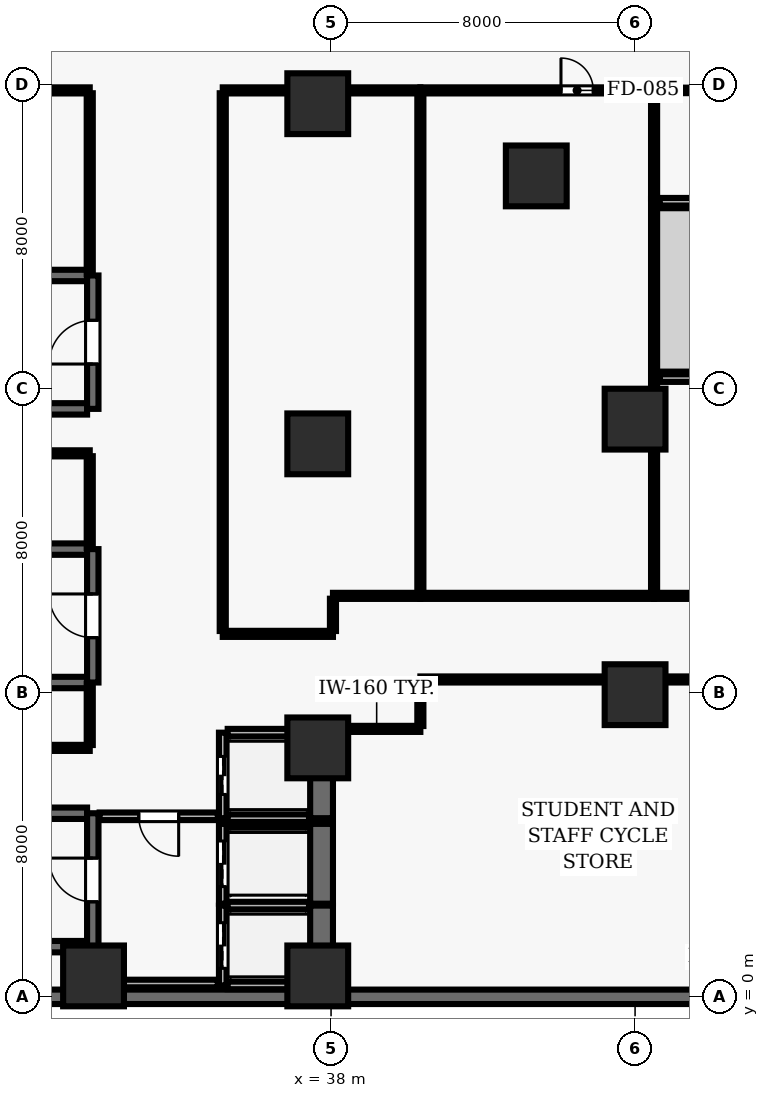
"""IFC4 building model, lengths in metres.
Left out: names, types, materials, properties, quantities, classifications, styles, units other than length and angle.
Written with IfcOpenShell. Run it as: python <this file> out.ifc"""

import sys

from ifc_helpers import new_model, si_unit, direction, frame, frame_2d, origin, origin_2d, place, context, subcontext, project, spatial, rectangle, extrude, element, fill, save


model = new_model("IFC4")
c1 = context("Model", 3, precision=1e-05, world=origin(), true_north=direction((0.0, 1.0)))
c2 = subcontext(c1, "Body", "Model", "MODEL_VIEW")
j1 = project(units=[si_unit("LENGTHUNIT", "METRE"), si_unit("PLANEANGLEUNIT", "RADIAN")], contexts=[c1])
p1 = place(None, origin())
s1 = spatial("IfcSite", under=j1, at=p1, CompositionType="ELEMENT")
p2 = place(p1, origin())
s2 = spatial("IfcBuilding", under=s1, at=p2, CompositionType="ELEMENT")
p3 = place(p2, frame((0.0, 0.0, -4.5)))
s3 = spatial("IfcBuildingStorey", under=s2, at=p3, CompositionType="ELEMENT", Elevation=-4.5)
for number, where, z_axis, x_axis in (
    (1, (31.75, 0.55, 0.0), (0.0, 0.0, 1.0), (1.0, 0.0, 0.0)),
    (2, (37.65, 0.55, 0.0), (0.0, 0.0, 1.0), (1.0, 0.0, 0.0)),
    (3, (37.65, 6.55, 0.0), (0.0, 0.0, 1.0), (1.0, 0.0, 0.0)),
    (4, (37.65, 14.55, 0.0), (0.0, 0.0, 1.0), (1.0, 0.0, 0.0)),
    (5, (37.65, 23.5, 0.0), (0.0, 0.0, 1.0), (1.0, 0.0, 0.0)),
    (6, (46.0, 7.95, 0.0), (0.0, 0.0, 1.0), (1.0, 0.0, 0.0)),
    (7, (46.0, 15.2, 0.0), (0.0, 0.0, 1.0), (1.0, 0.0, 0.0)),
    (8, (43.4, 21.6, 0.0), (0.0, 0.0, 1.0), (1.0, 0.0, 0.0)),
):
    element("IfcColumn", number, at=place(p3, frame(where, z_axis=z_axis, x_axis=x_axis)), inside=s3, PredefinedType="COLUMN", context=c2, shape_type="SweptSolid", body=[
        extrude(rectangle(XDim=1.6, YDim=1.6, at=origin_2d()), origin(), (0.0, 0.0, 1.0), 4.5),
    ])
p4 = place(p3, frame((24.5, 0.0, 0.0), z_axis=(0.0, 0.0, 1.0), x_axis=(1.0, 0.0, 0.0)))
e9 = element("IfcWall", 9, at=p4, inside=s3, PredefinedType="USERDEFINED", context=c2, shape_type="SweptSolid", body=[
    extrude(rectangle(XDim=49.0, YDim=0.38, at=frame_2d((24.5, 0.0))), origin(), (0.0, 0.0, 1.0), 4.22),
])
for number, where, z_axis, x_axis in (
    (10, (31.58, 4.83, 0.0), (0.0, 0.0, 1.0), (-1.0, 0.0, 0.0)),
    (11, (23.22, 1.32, 0.0), (0.0, 0.0, 1.0), (1.0, 0.0, 0.0)),
):
    element("IfcWall", number, at=place(p3, frame(where, z_axis=z_axis, x_axis=x_axis)), inside=s3, PredefinedType="SHEAR", context=c2, shape_type="SweptSolid", body=[
        extrude(rectangle(XDim=8.36, YDim=0.3, at=frame_2d((4.18, 0.0))), origin(), (0.0, 0.0, 1.0), 4.22),
    ])
p5 = place(p3, frame((31.73, 0.96, 0.0), z_axis=(0.0, 0.0, 1.0), x_axis=(0.0, 1.0, 0.0)))
e12 = element("IfcWall", 12, at=p5, inside=s3, PredefinedType="SHEAR", context=c2, shape_type="SweptSolid", body=[
    extrude(rectangle(XDim=3.87, YDim=0.3, at=frame_2d((1.935, 0.0))), origin(), (0.0, 0.0, 1.0), 4.22),
])
p6 = place(p5, frame((1.54, 0.0, 0.0)))
e13 = element("IfcOpeningElement", 13, at=p6, cuts=e12, PredefinedType="OPENING", context=c2, shape_type="SweptSolid", body=[
    extrude(rectangle(XDim=1.15, YDim=2.15, at=frame_2d((0.575, 1.075))), frame((0.0, 0.16, 0.0), z_axis=(0.0, -1.0, 0.0), x_axis=(1.0, 0.0, 0.0)), (0.0, 0.0, 1.0), 0.32),
])
for number, where, z_axis, x_axis in (
    (14, (31.58, 18.98, 0.0), (0.0, 0.0, 1.0), (-1.0, 0.0, 0.0)),
    (15, (23.22, 15.47, 0.0), (0.0, 0.0, 1.0), (1.0, 0.0, 0.0)),
):
    element("IfcWall", number, at=place(p3, frame(where, z_axis=z_axis, x_axis=x_axis)), inside=s3, PredefinedType="SHEAR", context=c2, shape_type="SweptSolid", body=[
        extrude(rectangle(XDim=8.36, YDim=0.3, at=frame_2d((4.18, 0.0))), origin(), (0.0, 0.0, 1.0), 4.22),
    ])
p7 = place(p3, frame((31.73, 15.47, 0.0), z_axis=(0.0, 0.0, 1.0), x_axis=(0.0, 1.0, 0.0)))
e16 = element("IfcWall", 16, at=p7, inside=s3, PredefinedType="SHEAR", context=c2, shape_type="SweptSolid", body=[
    extrude(rectangle(XDim=3.51, YDim=0.3, at=frame_2d((1.755, 0.0))), origin(), (0.0, 0.0, 1.0), 4.22),
])
p8 = place(p7, frame((1.18, 0.0, 0.0)))
e17 = element("IfcOpeningElement", 17, at=p8, cuts=e16, PredefinedType="OPENING", context=c2, shape_type="SweptSolid", body=[
    extrude(rectangle(XDim=1.15, YDim=2.15, at=frame_2d((0.575, 1.075))), frame((0.0, 0.16, 0.0), z_axis=(0.0, -1.0, 0.0), x_axis=(1.0, 0.0, 0.0)), (0.0, 0.0, 1.0), 0.32),
])
for number, where, z_axis, x_axis in (
    (18, (31.58, 11.78, 0.0), (0.0, 0.0, 1.0), (-1.0, 0.0, 0.0)),
    (19, (23.22, 8.27, 0.0), (0.0, 0.0, 1.0), (1.0, 0.0, 0.0)),
):
    element("IfcWall", number, at=place(p3, frame(where, z_axis=z_axis, x_axis=x_axis)), inside=s3, PredefinedType="SHEAR", context=c2, shape_type="SweptSolid", body=[
        extrude(rectangle(XDim=8.36, YDim=0.3, at=frame_2d((4.18, 0.0))), origin(), (0.0, 0.0, 1.0), 4.22),
    ])
p9 = place(p3, frame((31.73, 8.27, 0.0), z_axis=(0.0, 0.0, 1.0), x_axis=(0.0, 1.0, 0.0)))
e20 = element("IfcWall", 20, at=p9, inside=s3, PredefinedType="SHEAR", context=c2, shape_type="SweptSolid", body=[
    extrude(rectangle(XDim=3.51, YDim=0.3, at=frame_2d((1.755, 0.0))), origin(), (0.0, 0.0, 1.0), 4.22),
])
p10 = place(p9, frame((1.18, 0.0, 0.0)))
e21 = element("IfcOpeningElement", 21, at=p10, cuts=e20, PredefinedType="OPENING", context=c2, shape_type="SweptSolid", body=[
    extrude(rectangle(XDim=1.15, YDim=2.15, at=frame_2d((0.575, 1.075))), frame((0.0, 0.16, 0.0), z_axis=(0.0, -1.0, 0.0), x_axis=(1.0, 0.0, 0.0)), (0.0, 0.0, 1.0), 0.32),
])
p11 = place(p3, frame((35.15, 2.4, 0.0), z_axis=(0.0, 0.0, 1.0), x_axis=(0.0, -1.0, 0.0)))
e22 = element("IfcWall", 22, at=p11, inside=s3, PredefinedType="SOLIDWALL", context=c2, shape_type="SweptSolid", body=[
    extrude(rectangle(XDim=2.1, YDim=0.2, at=frame_2d((1.05, 0.0))), origin(), (0.0, 0.0, 1.0), 4.22),
])
p12 = place(p11, frame((0.45, 0.0, 0.0)))
e23 = element("IfcOpeningElement", 23, at=p12, cuts=e22, PredefinedType="OPENING", context=c2, shape_type="SweptSolid", body=[
    extrude(rectangle(XDim=1.2, YDim=2.15, at=frame_2d((0.6, 1.075))), frame((0.0, 0.11, 0.0), z_axis=(0.0, -1.0, 0.0), x_axis=(1.0, 0.0, 0.0)), (0.0, 0.0, 1.0), 0.22),
])
p13 = place(p3, frame((37.75, 0.3, 0.0), z_axis=(0.0, 0.0, 1.0), x_axis=(0.0, 1.0, 0.0)))
e24 = element("IfcWall", 24, at=p13, inside=s3, PredefinedType="SHEAR", context=c2, shape_type="SweptSolid", body=[
    extrude(rectangle(XDim=2.1, YDim=0.6, at=frame_2d((1.05, 0.0))), origin(), (0.0, 0.0, 1.0), 4.22),
])
for number, where, z_axis, x_axis in (
    (25, (35.28, 0.3, 0.0), (0.0, 0.0, 1.0), (1.0, 0.0, 0.0)),
    (26, (37.42, 2.4, 0.0), (0.0, 0.0, 1.0), (-1.0, 0.0, 0.0)),
):
    element("IfcWall", number, at=place(p3, frame(where, z_axis=z_axis, x_axis=x_axis)), inside=s3, PredefinedType="SOLIDWALL", context=c2, shape_type="SweptSolid", body=[
        extrude(rectangle(XDim=2.14, YDim=0.2, at=frame_2d((1.07, 0.0))), origin(), (0.0, 0.0, 1.0), 4.22),
    ])
p14 = place(p3, frame((35.15, 4.55, 0.0), z_axis=(0.0, 0.0, 1.0), x_axis=(0.0, -1.0, 0.0)))
e27 = element("IfcWall", 27, at=p14, inside=s3, PredefinedType="SOLIDWALL", context=c2, shape_type="SweptSolid", body=[
    extrude(rectangle(XDim=2.1, YDim=0.2, at=frame_2d((1.05, 0.0))), origin(), (0.0, 0.0, 1.0), 4.22),
])
p15 = place(p14, frame((0.45, 0.0, 0.0)))
e28 = element("IfcOpeningElement", 28, at=p15, cuts=e27, PredefinedType="OPENING", context=c2, shape_type="SweptSolid", body=[
    extrude(rectangle(XDim=1.2, YDim=2.15, at=frame_2d((0.6, 1.075))), frame((0.0, 0.11, 0.0), z_axis=(0.0, -1.0, 0.0), x_axis=(1.0, 0.0, 0.0)), (0.0, 0.0, 1.0), 0.22),
])
p16 = place(p3, frame((37.75, 2.45, 0.0), z_axis=(0.0, 0.0, 1.0), x_axis=(0.0, 1.0, 0.0)))
e29 = element("IfcWall", 29, at=p16, inside=s3, PredefinedType="SHEAR", context=c2, shape_type="SweptSolid", body=[
    extrude(rectangle(XDim=2.1, YDim=0.6, at=frame_2d((1.05, 0.0))), origin(), (0.0, 0.0, 1.0), 4.22),
])
p17 = place(p3, frame((37.42, 4.55, 0.0), z_axis=(0.0, 0.0, 1.0), x_axis=(-1.0, 0.0, 0.0)))
e30 = element("IfcWall", 30, at=p17, inside=s3, PredefinedType="SOLIDWALL", context=c2, shape_type="SweptSolid", body=[
    extrude(rectangle(XDim=2.14, YDim=0.2, at=frame_2d((1.07, 0.0))), origin(), (0.0, 0.0, 1.0), 4.22),
])
p18 = place(p3, frame((35.15, 6.95, 0.0), z_axis=(0.0, 0.0, 1.0), x_axis=(0.0, -1.0, 0.0)))
e31 = element("IfcWall", 31, at=p18, inside=s3, PredefinedType="SOLIDWALL", context=c2, shape_type="SweptSolid", body=[
    extrude(rectangle(XDim=2.25, YDim=0.2, at=frame_2d((1.125, 0.0))), origin(), (0.0, 0.0, 1.0), 4.22),
])
p19 = place(p18, frame((0.625, 0.0, 0.0)))
e32 = element("IfcOpeningElement", 32, at=p19, cuts=e31, PredefinedType="OPENING", context=c2, shape_type="SweptSolid", body=[
    extrude(rectangle(XDim=1.0, YDim=2.1, at=frame_2d((0.5, 1.05))), frame((0.0, 0.11, 0.0), z_axis=(0.0, -1.0, 0.0), x_axis=(1.0, 0.0, 0.0)), (0.0, 0.0, 1.0), 0.22),
])
p20 = place(p3, frame((37.75, 4.7, 0.0), z_axis=(0.0, 0.0, 1.0), x_axis=(0.0, 1.0, 0.0)))
e33 = element("IfcWall", 33, at=p20, inside=s3, PredefinedType="SHEAR", context=c2, shape_type="SweptSolid", body=[
    extrude(rectangle(XDim=2.25, YDim=0.6, at=frame_2d((1.125, 0.0))), origin(), (0.0, 0.0, 1.0), 4.22),
])
for number, where, z_axis, x_axis in (
    (34, (35.28, 4.7, 0.0), (0.0, 0.0, 1.0), (1.0, 0.0, 0.0)),
    (35, (37.42, 6.95, 0.0), (0.0, 0.0, 1.0), (-1.0, 0.0, 0.0)),
):
    element("IfcWall", number, at=place(p3, frame(where, z_axis=z_axis, x_axis=x_axis)), inside=s3, PredefinedType="SOLIDWALL", context=c2, shape_type="SweptSolid", body=[
        extrude(rectangle(XDim=2.14, YDim=0.2, at=frame_2d((1.07, 0.0))), origin(), (0.0, 0.0, 1.0), 4.22),
    ])
for number, where, z_axis, x_axis in (
    (36, (46.65, 16.28, 0.0), (0.0, 0.0, 1.0), (1.0, 0.0, 0.0)),
    (37, (46.65, 20.92, 0.0), (0.0, 0.0, 1.0), (1.0, 0.0, 0.0)),
):
    element("IfcWall", number, at=place(p3, frame(where, z_axis=z_axis, x_axis=x_axis)), inside=s3, PredefinedType="SOLIDWALL", context=c2, shape_type="SweptSolid", body=[
        extrude(rectangle(XDim=26.9, YDim=0.2, at=frame_2d((13.45, 0.0))), origin(), (0.0, 0.0, 1.0), 4.22),
    ])
for number, where, z_axis, x_axis in (
    (38, (28.8, 14.3, 0.0), (0.0, 0.0, 1.0), (1.0, 0.0, 0.0)),
    (39, (28.8, 23.85, 0.0), (0.0, 0.0, 1.0), (1.0, 0.0, 0.0)),
):
    element("IfcWall", number, at=place(p3, frame(where, z_axis=z_axis, x_axis=x_axis)), inside=s3, PredefinedType="PARTITIONING", context=c2, shape_type="SweptSolid", body=[
        extrude(rectangle(XDim=2.85, YDim=0.16, at=frame_2d((1.425, 0.0))), origin(), (0.0, 0.0, 1.0), 3.365),
    ])
p21 = place(p3, frame((31.65, 0.35, 0.0), z_axis=(0.0, 0.0, 1.0), x_axis=(1.0, 0.0, 0.0)))
e40 = element("IfcWall", 40, at=p21, inside=s3, PredefinedType="SOLIDWALL", context=c2, shape_type="SweptSolid", body=[
    extrude(rectangle(XDim=3.37, YDim=0.2, at=frame_2d((1.685, 0.0))), origin(), (0.0, 0.0, 1.0), 4.22),
])
p22 = place(p3, frame((31.65, 6.55, 0.0), z_axis=(0.0, 0.0, 1.0), x_axis=(-1.0, 0.0, 0.0)))
e41 = element("IfcWall", 41, at=p22, inside=s3, PredefinedType="PARTITIONING", context=c2, shape_type="SweptSolid", body=[
    extrude(rectangle(XDim=4.75, YDim=0.16, at=frame_2d((2.375, 0.0))), origin(), (0.0, 0.0, 1.0), 4.22),
])
p23 = place(p22, frame((1.935, 0.0, 0.0)))
e42 = element("IfcOpeningElement", 42, at=p23, cuts=e41, PredefinedType="OPENING", context=c2, shape_type="SweptSolid", body=[
    extrude(rectangle(XDim=0.88, YDim=2.1, at=frame_2d((0.44, 1.05))), frame((0.0, 0.09, 0.0), z_axis=(0.0, -1.0, 0.0), x_axis=(1.0, 0.0, 0.0)), (0.0, 0.0, 1.0), 0.18),
])
p24 = place(p3, frame((35.02, 4.75, 0.0), z_axis=(0.0, 0.0, 1.0), x_axis=(-1.0, 0.0, 0.0)))
e43 = element("IfcWall", 43, at=p24, inside=s3, PredefinedType="SOLIDWALL", context=c2, shape_type="SweptSolid", body=[
    extrude(rectangle(XDim=3.11, YDim=0.2, at=frame_2d((1.555, 0.0))), origin(), (0.0, 0.0, 1.0), 4.22),
])
p25 = place(p24, frame((1.03, 0.0, 0.0)))
e44 = element("IfcOpeningElement", 44, at=p25, cuts=e43, PredefinedType="OPENING", context=c2, shape_type="SweptSolid", body=[
    extrude(rectangle(XDim=1.05, YDim=2.15, at=frame_2d((0.525, 1.075))), frame((0.0, 0.11, 0.0), z_axis=(0.0, -1.0, 0.0), x_axis=(1.0, 0.0, 0.0)), (0.0, 0.0, 1.0), 0.22),
])
p26 = place(p3, frame((35.15, 23.85, 0.0), z_axis=(0.0, 0.0, 1.0), x_axis=(1.0, 0.0, 0.0)))
e45 = element("IfcWall", 45, at=p26, inside=s3, PredefinedType="PARTITIONING", context=c2, shape_type="SweptSolid", body=[
    extrude(rectangle(XDim=5.2, YDim=0.16, at=frame_2d((2.6, 0.0))), origin(), (0.0, 0.0, 1.0), 3.365),
])
p27 = place(p3, frame((38.05, 7.05, 0.0), z_axis=(0.0, 0.0, 1.0), x_axis=(1.0, 0.0, 0.0)))
e46 = element("IfcWall", 46, at=p27, inside=s3, PredefinedType="PARTITIONING", context=c2, shape_type="SweptSolid", body=[
    extrude(rectangle(XDim=2.3, YDim=0.16, at=frame_2d((1.15, 0.0))), origin(), (0.0, 0.0, 1.0), 4.22),
])
p28 = place(p3, frame((38.05, 9.55, 0.0), z_axis=(0.0, 0.0, 1.0), x_axis=(-1.0, 0.0, 0.0)))
e47 = element("IfcWall", 47, at=p28, inside=s3, PredefinedType="PARTITIONING", context=c2, shape_type="SweptSolid", body=[
    extrude(rectangle(XDim=2.9, YDim=0.16, at=frame_2d((1.45, 0.0))), origin(), (0.0, 0.0, 1.0), 4.22),
])
p29 = place(p3, frame((40.35, 8.35, 0.0), z_axis=(0.0, 0.0, 1.0), x_axis=(1.0, 0.0, 0.0)))
e48 = element("IfcWall", 48, at=p29, inside=s3, PredefinedType="PARTITIONING", context=c2, shape_type="SweptSolid", body=[
    extrude(rectangle(XDim=11.65, YDim=0.16, at=frame_2d((5.825, 0.0))), origin(), (0.0, 0.0, 1.0), 3.365),
])
p30 = place(p29, frame((7.825, 0.0, 0.0)))
e49 = element("IfcOpeningElement", 49, at=p30, cuts=e48, PredefinedType="OPENING", context=c2, shape_type="SweptSolid", body=[
    extrude(rectangle(XDim=0.9, YDim=2.1, at=frame_2d((0.45, 1.05))), frame((0.0, 0.09, 0.0), z_axis=(0.0, -1.0, 0.0), x_axis=(1.0, 0.0, 0.0)), (0.0, 0.0, 1.0), 0.18),
])
p31 = place(p3, frame((40.35, 10.55, 0.0), z_axis=(0.0, 0.0, 1.0), x_axis=(-1.0, 0.0, 0.0)))
e50 = element("IfcWall", 50, at=p31, inside=s3, PredefinedType="PARTITIONING", context=c2, shape_type="SweptSolid", body=[
    extrude(rectangle(XDim=2.3, YDim=0.16, at=frame_2d((1.15, 0.0))), origin(), (0.0, 0.0, 1.0), 3.751),
])
p32 = place(p3, frame((40.35, 23.85, 0.0), z_axis=(0.0, 0.0, 1.0), x_axis=(1.0, 0.0, 0.0)))
e51 = element("IfcWall", 51, at=p32, inside=s3, PredefinedType="PARTITIONING", context=c2, shape_type="SweptSolid", body=[
    extrude(rectangle(XDim=6.15, YDim=0.16, at=frame_2d((3.075, 0.0))), origin(), (0.0, 0.0, 1.0), 4.22),
])
p33 = place(p32, frame((3.7, 0.0, 0.0)))
e52 = element("IfcOpeningElement", 52, at=p33, cuts=e51, PredefinedType="OPENING", context=c2, shape_type="SweptSolid", body=[
    extrude(rectangle(XDim=0.85, YDim=2.1, at=frame_2d((0.425, 1.05))), frame((0.0, 0.09, 0.0), z_axis=(0.0, -1.0, 0.0), x_axis=(1.0, 0.0, 0.0)), (0.0, 0.0, 1.0), 0.18),
])
p34 = place(p3, frame((46.5, 10.55, 0.0), z_axis=(0.0, 0.0, 1.0), x_axis=(-1.0, 0.0, 0.0)))
e53 = element("IfcWall", 53, at=p34, inside=s3, PredefinedType="PARTITIONING", context=c2, shape_type="SweptSolid", body=[
    extrude(rectangle(XDim=6.15, YDim=0.16, at=frame_2d((3.075, 0.0))), origin(), (0.0, 0.0, 1.0), 3.751),
])
p35 = place(p3, frame((46.5, 23.85, 0.0), z_axis=(0.0, 0.0, 1.0), x_axis=(1.0, 0.0, 0.0)))
e54 = element("IfcWall", 54, at=p35, inside=s3, PredefinedType="PARTITIONING", context=c2, shape_type="SweptSolid", body=[
    extrude(rectangle(XDim=7.5, YDim=0.145, at=frame_2d((3.75, 0.0))), origin(), (0.0, 0.0, 1.0), 4.22),
])
p36 = place(p3, frame((52.0, 10.55, 0.0), z_axis=(0.0, 0.0, 1.0), x_axis=(-1.0, 0.0, 0.0)))
e55 = element("IfcWall", 55, at=p36, inside=s3, PredefinedType="PARTITIONING", context=c2, shape_type="SweptSolid", body=[
    extrude(rectangle(XDim=5.5, YDim=0.16, at=frame_2d((2.75, 0.0))), origin(), (0.0, 0.0, 1.0), 3.751),
])
p37 = place(p3, frame((31.65, 8.24, 0.0), z_axis=(0.0, 0.0, 1.0), x_axis=(0.0, -1.0, 0.0)))
e56 = element("IfcWall", 56, at=p37, inside=s3, PredefinedType="PARTITIONING", context=c2, shape_type="SweptSolid", body=[
    extrude(rectangle(XDim=1.615, YDim=0.16, at=frame_2d((0.808, 0.0))), origin(), (0.0, 0.0, 1.0), 4.22),
])
p38 = place(p3, frame((31.65, 14.225, 0.0), z_axis=(0.0, 0.0, 1.0), x_axis=(0.0, -1.0, 0.0)))
e57 = element("IfcWall", 57, at=p38, inside=s3, PredefinedType="PARTITIONING", context=c2, shape_type="SweptSolid", body=[
    extrude(rectangle(XDim=2.415, YDim=0.16, at=frame_2d((1.208, 0.0))), origin(), (0.0, 0.0, 1.0), 4.22),
])
p39 = place(p3, frame((31.65, 23.775, 0.0), z_axis=(0.0, 0.0, 1.0), x_axis=(0.0, -1.0, 0.0)))
e58 = element("IfcWall", 58, at=p39, inside=s3, PredefinedType="PARTITIONING", context=c2, shape_type="SweptSolid", body=[
    extrude(rectangle(XDim=4.765, YDim=0.16, at=frame_2d((2.382, 0.0))), origin(), (0.0, 0.0, 1.0), 4.22),
])
p40 = place(p3, frame((35.15, 9.625, 0.0), z_axis=(0.0, 0.0, 1.0), x_axis=(0.0, 1.0, 0.0)))
e59 = element("IfcWall", 59, at=p40, inside=s3, PredefinedType="PARTITIONING", context=c2, shape_type="SweptSolid", body=[
    extrude(rectangle(XDim=14.15, YDim=0.16, at=frame_2d((7.075, 0.0))), origin(), (0.0, 0.0, 1.0), 4.22),
])
p41 = place(p3, frame((38.05, 10.475, 0.0), z_axis=(0.0, 0.0, 1.0), x_axis=(0.0, -1.0, 0.0)))
e60 = element("IfcWall", 60, at=p41, inside=s3, PredefinedType="PARTITIONING", context=c2, shape_type="SweptSolid", body=[
    extrude(rectangle(XDim=0.85, YDim=0.16, at=frame_2d((0.425, 0.0))), origin(), (0.0, 0.0, 1.0), 3.365),
])
p42 = place(p3, frame((40.35, 7.125, 0.0), z_axis=(0.0, 0.0, 1.0), x_axis=(0.0, 1.0, 0.0)))
e61 = element("IfcWall", 61, at=p42, inside=s3, PredefinedType="PARTITIONING", context=c2, shape_type="SweptSolid", body=[
    extrude(rectangle(XDim=1.15, YDim=0.16, at=frame_2d((0.575, 0.0))), origin(), (0.0, 0.0, 1.0), 4.22),
])
p43 = place(p3, frame((40.35, 23.775, 0.0), z_axis=(0.0, 0.0, 1.0), x_axis=(0.0, -1.0, 0.0)))
e62 = element("IfcWall", 62, at=p43, inside=s3, PredefinedType="PARTITIONING", context=c2, shape_type="SweptSolid", body=[
    extrude(rectangle(XDim=13.15, YDim=0.16, at=frame_2d((6.575, 0.0))), origin(), (0.0, 0.0, 1.0), 3.751),
])
p44 = place(p3, frame((46.5, 10.625, 0.0), z_axis=(0.0, 0.0, 1.0), x_axis=(0.0, 1.0, 0.0)))
e63 = element("IfcWall", 63, at=p44, inside=s3, PredefinedType="PARTITIONING", context=c2, shape_type="SweptSolid", body=[
    extrude(rectangle(XDim=10.375, YDim=0.16, at=frame_2d((5.188, 0.0))), origin(), (0.0, 0.0, 1.0), 3.365),
])
p45 = place(p3, frame((46.5, 21.0, 0.0), z_axis=(0.0, 0.0, 1.0), x_axis=(0.0, 1.0, 0.0)))
e64 = element("IfcWall", 64, at=p45, inside=s3, PredefinedType="PARTITIONING", context=c2, shape_type="SweptSolid", body=[
    extrude(rectangle(XDim=2.775, YDim=0.16, at=frame_2d((1.387, 0.0))), origin(), (0.0, 0.0, 1.0), 4.22),
])
p46 = place(p6, origin())
e65 = element("IfcDoor", 65, at=p46, inside=s3, OperationType="SINGLE_SWING_RIGHT", PredefinedType="DOOR", context=c2, shape_type="SweptSolid", body=[
    extrude(rectangle(XDim=1.15, YDim=2.15, at=frame_2d((0.575, 1.075))), frame((0.0, 0.025, 0.0), z_axis=(0.0, -1.0, 0.0), x_axis=(1.0, 0.0, 0.0)), (0.0, 0.0, 1.0), 0.05),
])
fill(e13, e65)
p47 = place(p8, origin())
e66 = element("IfcDoor", 66, at=p47, inside=s3, OperationType="SINGLE_SWING_LEFT", PredefinedType="DOOR", context=c2, shape_type="SweptSolid", body=[
    extrude(rectangle(XDim=1.15, YDim=2.15, at=frame_2d((0.575, 1.075))), frame((0.0, 0.025, 0.0), z_axis=(0.0, -1.0, 0.0), x_axis=(1.0, 0.0, 0.0)), (0.0, 0.0, 1.0), 0.05),
])
fill(e17, e66)
p48 = place(p10, origin())
e67 = element("IfcDoor", 67, at=p48, inside=s3, OperationType="SINGLE_SWING_RIGHT", PredefinedType="DOOR", context=c2, shape_type="SweptSolid", body=[
    extrude(rectangle(XDim=1.15, YDim=2.15, at=frame_2d((0.575, 1.075))), frame((0.0, 0.025, 0.0), z_axis=(0.0, -1.0, 0.0), x_axis=(1.0, 0.0, 0.0)), (0.0, 0.0, 1.0), 0.05),
])
fill(e21, e67)
p49 = place(p12, origin())
e68 = element("IfcDoor", 68, at=p49, inside=s3, OperationType="DOUBLE_DOOR_SLIDING", PredefinedType="DOOR", context=c2, shape_type="SweptSolid", body=[
    extrude(rectangle(XDim=1.2, YDim=2.15, at=frame_2d((0.6, 1.075))), frame((0.0, 0.025, 0.0), z_axis=(0.0, -1.0, 0.0), x_axis=(1.0, 0.0, 0.0)), (0.0, 0.0, 1.0), 0.05),
])
fill(e23, e68)
p50 = place(p15, origin())
e69 = element("IfcDoor", 69, at=p50, inside=s3, OperationType="DOUBLE_DOOR_SLIDING", PredefinedType="DOOR", context=c2, shape_type="SweptSolid", body=[
    extrude(rectangle(XDim=1.2, YDim=2.15, at=frame_2d((0.6, 1.075))), frame((0.0, 0.025, 0.0), z_axis=(0.0, -1.0, 0.0), x_axis=(1.0, 0.0, 0.0)), (0.0, 0.0, 1.0), 0.05),
])
fill(e28, e69)
p51 = place(p19, origin())
e70 = element("IfcDoor", 70, at=p51, inside=s3, OperationType="DOUBLE_DOOR_SLIDING", PredefinedType="DOOR", context=c2, shape_type="SweptSolid", body=[
    extrude(rectangle(XDim=1.0, YDim=2.1, at=frame_2d((0.5, 1.05))), frame((0.0, 0.025, 0.0), z_axis=(0.0, -1.0, 0.0), x_axis=(1.0, 0.0, 0.0)), (0.0, 0.0, 1.0), 0.05),
])
fill(e32, e70)
p52 = place(p25, origin())
e71 = element("IfcDoor", 71, at=p52, inside=s3, OperationType="SINGLE_SWING_LEFT", PredefinedType="DOOR", context=c2, shape_type="SweptSolid", body=[
    extrude(rectangle(XDim=1.05, YDim=2.15, at=frame_2d((0.525, 1.075))), frame((0.0, 0.025, 0.0), z_axis=(0.0, -1.0, 0.0), x_axis=(1.0, 0.0, 0.0)), (0.0, 0.0, 1.0), 0.05),
])
fill(e44, e71)
p53 = place(p33, origin())
e72 = element("IfcDoor", 72, at=p53, inside=s3, OperationType="SINGLE_SWING_LEFT", PredefinedType="DOOR", context=c2, shape_type="SweptSolid", body=[
    extrude(rectangle(XDim=0.85, YDim=2.1, at=frame_2d((0.425, 1.05))), frame((0.0, 0.025, 0.0), z_axis=(0.0, -1.0, 0.0), x_axis=(1.0, 0.0, 0.0)), (0.0, 0.0, 1.0), 0.05),
])
fill(e52, e72)
save(model, sys.argv[1])
